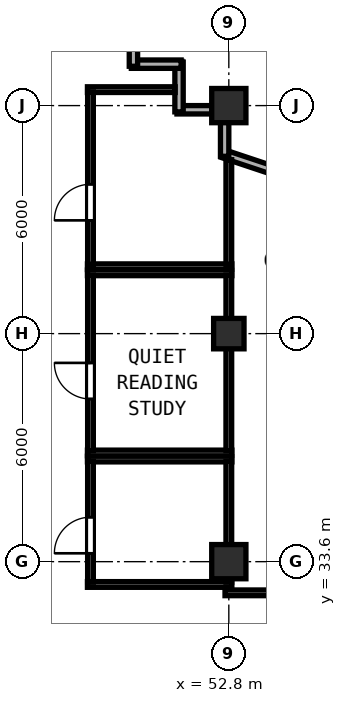
"""IFC4 building model, lengths in metres.
Left out: names, types, materials, properties, quantities, classifications, styles, units other than length and angle.
Written with IfcOpenShell. Run it as: python <this file> out.ifc"""

import sys

from ifc_helpers import new_model, si_unit, direction, frame, frame_2d, origin, origin_2d, place, context, subcontext, project, spatial, rectangle, hollow_rectangle, extrude, element, fill, save


model = new_model("IFC4")
c1 = context("Model", 3, precision=1e-05, world=origin(), true_north=direction((0.0, 1.0)))
c2 = subcontext(c1, "Body", "Model", "MODEL_VIEW")
j1 = project(units=[si_unit("LENGTHUNIT", "METRE"), si_unit("PLANEANGLEUNIT", "RADIAN")], contexts=[c1])
p1 = place(None, origin())
s1 = spatial("IfcSite", under=j1, at=p1, CompositionType="ELEMENT")
p2 = place(p1, origin())
s2 = spatial("IfcBuilding", under=s1, at=p2, CompositionType="ELEMENT")
p3 = place(p2, frame((0.0, 0.0, 223.0)))
s3 = spatial("IfcBuildingStorey", under=s2, at=p3, CompositionType="ELEMENT", Elevation=223.0)
for number, where, z_axis, x_axis in (
    (1, (52.8, 33.6, 0.0), (0.0, 0.0, 1.0), (1.0, 0.0, 0.0)),
    (2, (52.8, 45.6, 0.0), (0.0, 0.0, 1.0), (1.0, 0.0, 0.0)),
):
    element("IfcColumn", number, at=place(p3, frame(where, z_axis=z_axis, x_axis=x_axis)), inside=s3, PredefinedType="COLUMN", context=c2, shape_type="SweptSolid", body=[
        extrude(hollow_rectangle(XDim=0.9, YDim=0.9, WallThickness=0.034, at=origin_2d()), origin(), (0.0, 0.0, 1.0), 3.8),
    ])
p4 = place(p3, frame((52.8, 39.6, 0.0), z_axis=(0.0, 0.0, 1.0), x_axis=(1.0, 0.0, 0.0)))
e3 = element("IfcColumn", 3, at=p4, inside=s3, PredefinedType="COLUMN", context=c2, shape_type="SweptSolid", body=[
    extrude(hollow_rectangle(XDim=0.8, YDim=0.8, WallThickness=0.03, at=origin_2d()), origin(), (0.0, 0.0, 1.0), 3.8),
])
p5 = place(p3, frame((58.476, 42.392, 0.0), z_axis=(0.0, 0.0, 1.0), x_axis=(-0.948691231611, 0.316203964339, 0.0)))
e4 = element("IfcWall", 4, at=p5, inside=s3, PredefinedType="SOLIDWALL", context=c2, shape_type="SweptSolid", body=[
    extrude(rectangle(XDim=6.154, YDim=0.22, at=frame_2d((3.077, 0.0))), origin(), (0.0, 0.0, 1.0), 3.215),
])
p6 = place(p5, frame((1.863, 0.0, 0.85)))
e5 = element("IfcOpeningElement", 5, at=p6, cuts=e4, PredefinedType="OPENING", context=c2, shape_type="SweptSolid", body=[
    extrude(rectangle(XDim=1.1, YDim=1.75, at=frame_2d((0.55, 0.875))), frame((0.0, 0.12, 0.0), z_axis=(0.0, -1.0, 0.0), x_axis=(1.0, 0.0, 0.0)), (0.0, 0.0, 1.0), 0.24),
])
p7 = place(p3, frame((52.69, 44.266, 0.0), z_axis=(0.0, 0.0, 1.0), x_axis=(0.0, 1.0, 0.0)))
e6 = element("IfcWall", 6, at=p7, inside=s3, PredefinedType="SOLIDWALL", context=c2, shape_type="SweptSolid", body=[
    extrude(rectangle(XDim=0.892, YDim=0.22, at=frame_2d((0.446, 0.0))), origin(), (0.0, 0.0, 1.0), 3.215),
])
p8 = place(p3, frame((52.358, 45.49, 0.0), z_axis=(0.0, 0.0, 1.0), x_axis=(-1.0, 0.0, 0.0)))
e7 = element("IfcWall", 7, at=p8, inside=s3, PredefinedType="SOLIDWALL", context=c2, shape_type="SweptSolid", body=[
    extrude(rectangle(XDim=0.923, YDim=0.22, at=frame_2d((0.461, 0.0))), origin(), (0.0, 0.0, 1.0), 3.62),
])
p9 = place(p3, frame((51.49, 45.435, 0.0), z_axis=(0.0, 0.0, 1.0), x_axis=(0.0, 1.0, 0.0)))
e8 = element("IfcWall", 8, at=p9, inside=s3, PredefinedType="SOLIDWALL", context=c2, shape_type="SweptSolid", body=[
    extrude(rectangle(XDim=1.31, YDim=0.22, at=frame_2d((0.655, 0.0))), origin(), (0.0, 0.0, 1.0), 3.62),
])
p10 = place(p3, frame((51.545, 46.69, 0.0), z_axis=(0.0, 0.0, 1.0), x_axis=(-1.0, 0.0, 0.0)))
e9 = element("IfcWall", 9, at=p10, inside=s3, PredefinedType="SOLIDWALL", context=c2, shape_type="SweptSolid", body=[
    extrude(rectangle(XDim=1.31, YDim=0.22, at=frame_2d((0.655, 0.0))), origin(), (0.0, 0.0, 1.0), 3.62),
])
p11 = place(p3, frame((50.29, 46.635, 0.0), z_axis=(0.0, 0.0, 1.0), x_axis=(0.0, 1.0, 0.0)))
e10 = element("IfcWall", 10, at=p11, inside=s3, PredefinedType="SOLIDWALL", context=c2, shape_type="SweptSolid", body=[
    extrude(rectangle(XDim=1.535, YDim=0.22, at=frame_2d((0.768, 0.0))), origin(), (0.0, 0.0, 1.0), 3.62),
])
for number, where, z_axis, x_axis in (
    (11, (49.08, 36.3, 0.0), (0.0, 0.0, 1.0), (1.0, 0.0, 0.0)),
    (12, (49.08, 33.0, 0.0), (0.0, 0.0, 1.0), (1.0, 0.0, 0.0)),
):
    element("IfcWall", number, at=place(p3, frame(where, z_axis=z_axis, x_axis=x_axis)), inside=s3, PredefinedType="PARTITIONING", context=c2, shape_type="SweptSolid", body=[
        extrude(rectangle(XDim=3.8, YDim=0.15, at=frame_2d((1.9, 0.0))), origin(), (0.0, 0.0, 1.0), 3.62),
    ])
p12 = place(p3, frame((49.16, 33.06, 0.0), z_axis=(0.0, 0.0, 1.0), x_axis=(0.0, 1.0, 0.0)))
e13 = element("IfcWall", 13, at=p12, inside=s3, PredefinedType="PARTITIONING", context=c2, shape_type="SweptSolid", body=[
    extrude(rectangle(XDim=3.18, YDim=0.15, at=frame_2d((1.59, 0.0))), origin(), (0.0, 0.0, 1.0), 3.62),
])
p13 = place(p12, frame((0.76, 0.0, 0.0)))
e14 = element("IfcOpeningElement", 14, at=p13, cuts=e13, PredefinedType="OPENING", context=c2, shape_type="SweptSolid", body=[
    extrude(rectangle(XDim=0.95, YDim=2.12, at=frame_2d((0.475, 1.06))), frame((0.0, 0.085, 0.0), z_axis=(0.0, -1.0, 0.0), x_axis=(1.0, 0.0, 0.0)), (0.0, 0.0, 1.0), 0.17),
])
p14 = place(p3, frame((52.8, 33.06, 0.0), z_axis=(0.0, 0.0, 1.0), x_axis=(0.0, 1.0, 0.0)))
e15 = element("IfcWall", 15, at=p14, inside=s3, PredefinedType="PARTITIONING", context=c2, shape_type="SweptSolid", body=[
    extrude(rectangle(XDim=3.18, YDim=0.15, at=frame_2d((1.59, 0.0))), origin(), (0.0, 0.0, 1.0), 3.215),
])
for number, where, z_axis, x_axis in (
    (16, (49.08, 41.2, 0.0), (0.0, 0.0, 1.0), (1.0, 0.0, 0.0)),
    (17, (49.08, 36.46, 0.0), (0.0, 0.0, 1.0), (1.0, 0.0, 0.0)),
):
    element("IfcWall", number, at=place(p3, frame(where, z_axis=z_axis, x_axis=x_axis)), inside=s3, PredefinedType="PARTITIONING", context=c2, shape_type="SweptSolid", body=[
        extrude(rectangle(XDim=3.8, YDim=0.15, at=frame_2d((1.9, 0.0))), origin(), (0.0, 0.0, 1.0), 3.62),
    ])
p15 = place(p3, frame((49.16, 36.52, 0.0), z_axis=(0.0, 0.0, 1.0), x_axis=(0.0, 1.0, 0.0)))
e18 = element("IfcWall", 18, at=p15, inside=s3, PredefinedType="PARTITIONING", context=c2, shape_type="SweptSolid", body=[
    extrude(rectangle(XDim=4.62, YDim=0.15, at=frame_2d((2.31, 0.0))), origin(), (0.0, 0.0, 1.0), 3.62),
])
p16 = place(p15, frame((1.36, 0.0, 0.0)))
e19 = element("IfcOpeningElement", 19, at=p16, cuts=e18, PredefinedType="OPENING", context=c2, shape_type="SweptSolid", body=[
    extrude(rectangle(XDim=0.95, YDim=2.12, at=frame_2d((0.475, 1.06))), frame((0.0, 0.085, 0.0), z_axis=(0.0, -1.0, 0.0), x_axis=(1.0, 0.0, 0.0)), (0.0, 0.0, 1.0), 0.17),
])
p17 = place(p3, frame((52.8, 36.52, 0.0), z_axis=(0.0, 0.0, 1.0), x_axis=(0.0, 1.0, 0.0)))
e20 = element("IfcWall", 20, at=p17, inside=s3, PredefinedType="PARTITIONING", context=c2, shape_type="SweptSolid", body=[
    extrude(rectangle(XDim=4.62, YDim=0.15, at=frame_2d((2.31, 0.0))), origin(), (0.0, 0.0, 1.0), 3.215),
])
p18 = place(p3, frame((49.08, 46.02, 0.0), z_axis=(0.0, 0.0, 1.0), x_axis=(1.0, 0.0, 0.0)))
e21 = element("IfcWall", 21, at=p18, inside=s3, PredefinedType="PARTITIONING", context=c2, shape_type="SweptSolid", body=[
    extrude(rectangle(XDim=2.308, YDim=0.15, at=frame_2d((1.154, 0.0))), origin(), (0.0, 0.0, 1.0), 3.62),
])
p19 = place(p3, frame((49.08, 41.36, 0.0), z_axis=(0.0, 0.0, 1.0), x_axis=(1.0, 0.0, 0.0)))
e22 = element("IfcWall", 22, at=p19, inside=s3, PredefinedType="PARTITIONING", context=c2, shape_type="SweptSolid", body=[
    extrude(rectangle(XDim=3.8, YDim=0.15, at=frame_2d((1.9, 0.0))), origin(), (0.0, 0.0, 1.0), 3.62),
])
p20 = place(p3, frame((49.16, 41.42, 0.0), z_axis=(0.0, 0.0, 1.0), x_axis=(0.0, 1.0, 0.0)))
e23 = element("IfcWall", 23, at=p20, inside=s3, PredefinedType="PARTITIONING", context=c2, shape_type="SweptSolid", body=[
    extrude(rectangle(XDim=4.54, YDim=0.15, at=frame_2d((2.27, 0.0))), origin(), (0.0, 0.0, 1.0), 3.62),
])
p21 = place(p20, frame((1.16, 0.0, 0.0)))
e24 = element("IfcOpeningElement", 24, at=p21, cuts=e23, PredefinedType="OPENING", context=c2, shape_type="SweptSolid", body=[
    extrude(rectangle(XDim=0.95, YDim=2.12, at=frame_2d((0.475, 1.06))), frame((0.0, 0.085, 0.0), z_axis=(0.0, -1.0, 0.0), x_axis=(1.0, 0.0, 0.0)), (0.0, 0.0, 1.0), 0.17),
])
p22 = place(p3, frame((52.8, 41.42, 0.0), z_axis=(0.0, 0.0, 1.0), x_axis=(0.0, 1.0, 0.0)))
e25 = element("IfcWall", 25, at=p22, inside=s3, PredefinedType="PARTITIONING", context=c2, shape_type="SweptSolid", body=[
    extrude(rectangle(XDim=2.757, YDim=0.15, at=frame_2d((1.378, 0.0))), origin(), (0.0, 0.0, 1.0), 3.215),
])
p23 = place(p3, frame((52.7, 32.78, 0.0), z_axis=(0.0, 0.0, 1.0), x_axis=(1.0, 0.0, 0.0)))
e26 = element("IfcWall", 26, at=p23, inside=s3, PredefinedType="PARTITIONING", context=c2, shape_type="SweptSolid", body=[
    extrude(rectangle(XDim=4.3, YDim=0.15, at=frame_2d((2.15, 0.0))), origin(), (0.0, 0.0, 1.0), 3.62),
])
p24 = place(p23, frame((3.082, 0.0, 0.0)))
e27 = element("IfcOpeningElement", 27, at=p24, cuts=e26, PredefinedType="OPENING", context=c2, shape_type="SweptSolid", body=[
    extrude(rectangle(XDim=0.95, YDim=2.15, at=frame_2d((0.475, 1.075))), frame((0.0, 0.085, 0.0), z_axis=(0.0, -1.0, 0.0), x_axis=(1.0, 0.0, 0.0)), (0.0, 0.0, 1.0), 0.17),
])
p25 = place(p13, origin())
e28 = element("IfcDoor", 28, at=p25, inside=s3, OperationType="SINGLE_SWING_LEFT", PredefinedType="DOOR", context=c2, shape_type="SweptSolid", body=[
    extrude(rectangle(XDim=0.95, YDim=2.12, at=frame_2d((0.475, 1.06))), frame((0.0, 0.025, 0.0), z_axis=(0.0, -1.0, 0.0), x_axis=(1.0, 0.0, 0.0)), (0.0, 0.0, 1.0), 0.05),
])
fill(e14, e28)
p26 = place(p16, origin())
e29 = element("IfcDoor", 29, at=p26, inside=s3, OperationType="SINGLE_SWING_RIGHT", PredefinedType="DOOR", context=c2, shape_type="SweptSolid", body=[
    extrude(rectangle(XDim=0.95, YDim=2.12, at=frame_2d((0.475, 1.06))), frame((0.0, 0.025, 0.0), z_axis=(0.0, -1.0, 0.0), x_axis=(1.0, 0.0, 0.0)), (0.0, 0.0, 1.0), 0.05),
])
fill(e19, e29)
p27 = place(p21, origin())
e30 = element("IfcDoor", 30, at=p27, inside=s3, OperationType="SINGLE_SWING_LEFT", PredefinedType="DOOR", context=c2, shape_type="SweptSolid", body=[
    extrude(rectangle(XDim=0.95, YDim=2.12, at=frame_2d((0.475, 1.06))), frame((0.0, 0.025, 0.0), z_axis=(0.0, -1.0, 0.0), x_axis=(1.0, 0.0, 0.0)), (0.0, 0.0, 1.0), 0.05),
])
fill(e24, e30)
save(model, sys.argv[1])
